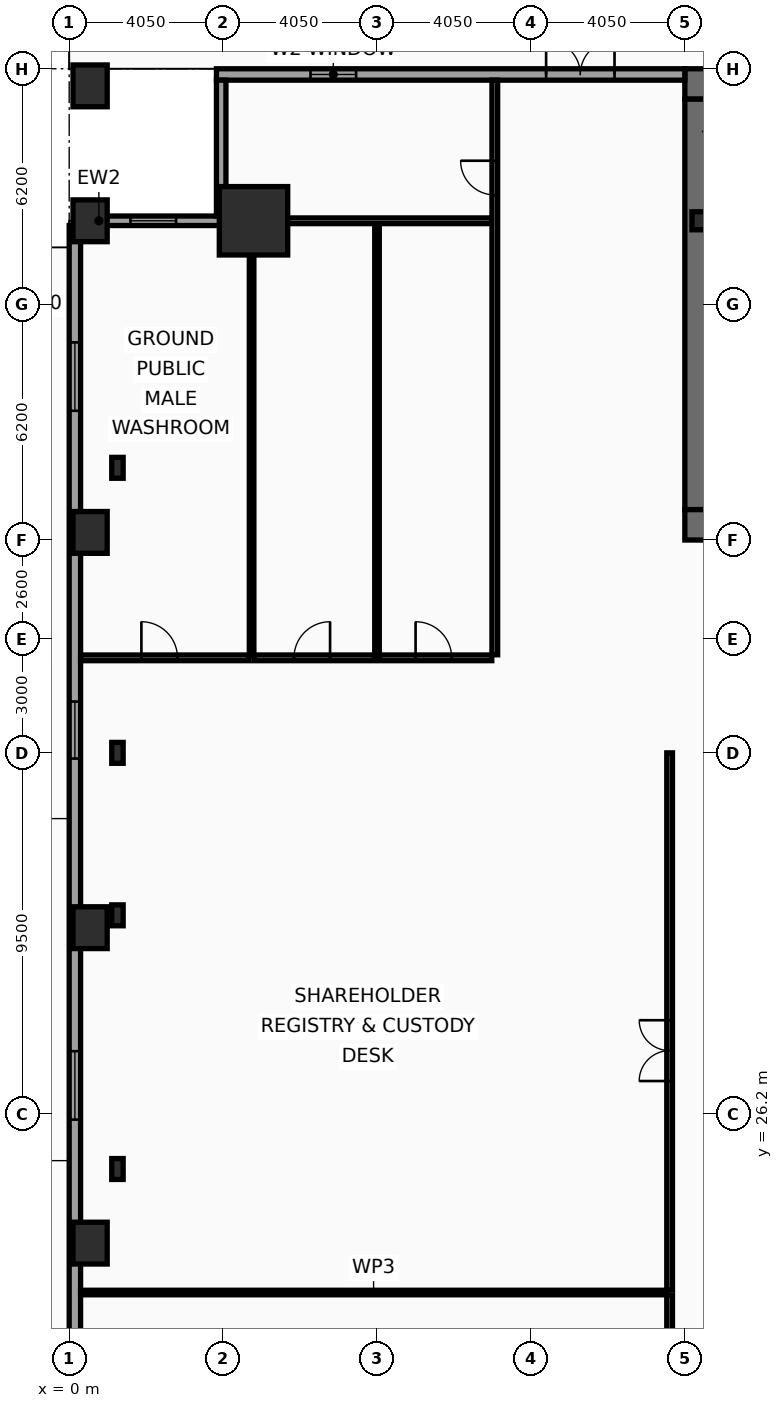
"""IFC4 building model, lengths in metres.
Left out: names, types, materials, properties, quantities, classifications, styles, units other than length and angle.
Written with IfcOpenShell. Run it as: python <this file> out.ifc"""

import sys

from ifc_helpers import new_model, si_unit, direction, frame, frame_2d, origin, origin_2d, place, context, subcontext, project, spatial, rectangle, hollow_rectangle, i_section, extrude, element, fill, save


model = new_model("IFC4")
c1 = context("Model", 3, precision=1e-05, world=origin(), true_north=direction((0.0, 1.0)))
c2 = subcontext(c1, "Body", "Model", "MODEL_VIEW")
j1 = project(units=[si_unit("LENGTHUNIT", "METRE"), si_unit("PLANEANGLEUNIT", "RADIAN")], contexts=[c1])
p1 = place(None, origin())
s1 = spatial("IfcSite", under=j1, at=p1, CompositionType="ELEMENT")
p2 = place(p1, origin())
s2 = spatial("IfcBuilding", under=s1, at=p2, CompositionType="ELEMENT")
p3 = place(p2, origin())
s3 = spatial("IfcBuildingStorey", under=s2, at=p3, CompositionType="ELEMENT", Elevation=0.0)
p4 = place(p3, frame((16.2, 53.3, 0.0), z_axis=(0.0, 0.0, 1.0), x_axis=(1.0, 0.0, 0.0)))
e1 = element("IfcWall", 1, at=p4, inside=s3, PredefinedType="SHEAR", context=c2, shape_type="SweptSolid", body=[
    extrude(rectangle(XDim=40.5, YDim=0.8, at=frame_2d((20.25, 0.0))), origin(), (0.0, 0.0, 1.0), 5.2),
])
p5 = place(p4, frame((2.8, 0.0, 0.0)))
e2 = element("IfcOpeningElement", 2, at=p5, cuts=e1, PredefinedType="OPENING", context=c2, shape_type="SweptSolid", body=[
    extrude(rectangle(XDim=1.8, YDim=2.4, at=frame_2d((0.9, 1.2))), frame((0.0, 0.41, 0.0), z_axis=(0.0, -1.0, 0.0), x_axis=(1.0, 0.0, 0.0)), (0.0, 0.0, 1.0), 0.82),
])
p6 = place(p4, frame((19.3, 0.0, 0.0)))
e3 = element("IfcOpeningElement", 3, at=p6, cuts=e1, PredefinedType="OPENING", context=c2, shape_type="SweptSolid", body=[
    extrude(rectangle(XDim=1.8, YDim=2.4, at=frame_2d((0.9, 1.2))), frame((0.0, 0.41, 0.0), z_axis=(0.0, -1.0, 0.0), x_axis=(1.0, 0.0, 0.0)), (0.0, 0.0, 1.0), 0.82),
])
p7 = place(p4, frame((35.9, 0.0, 0.0)))
e4 = element("IfcOpeningElement", 4, at=p7, cuts=e1, PredefinedType="OPENING", context=c2, shape_type="SweptSolid", body=[
    extrude(rectangle(XDim=1.8, YDim=2.4, at=frame_2d((0.9, 1.2))), frame((0.0, 0.41, 0.0), z_axis=(0.0, -1.0, 0.0), x_axis=(1.0, 0.0, 0.0)), (0.0, 0.0, 1.0), 0.82),
])
p8 = place(p3, frame((16.6, 42.1, 0.0), z_axis=(0.0, 0.0, 1.0), x_axis=(0.0, 1.0, 0.0)))
e5 = element("IfcWall", 5, at=p8, inside=s3, PredefinedType="SHEAR", context=c2, shape_type="SweptSolid", body=[
    extrude(rectangle(XDim=10.8, YDim=0.8, at=frame_2d((5.4, 0.0))), origin(), (0.0, 0.0, 1.0), 5.2),
])
p9 = place(p3, frame((18.65, 41.7, 0.0), z_axis=(0.0, 0.0, 1.0), x_axis=(-1.0, 0.0, 0.0)))
e6 = element("IfcWall", 6, at=p9, inside=s3, PredefinedType="SHEAR", context=c2, shape_type="SweptSolid", body=[
    extrude(rectangle(XDim=2.45, YDim=0.8, at=frame_2d((1.225, 0.0))), origin(), (0.0, 0.0, 1.0), 5.2),
])
p10 = place(p3, frame((4.85, 49.7, 0.0), z_axis=(0.0, 0.0, 1.0), x_axis=(1.0, 0.0, 0.0)))
e7 = element("IfcColumn", 7, at=p10, inside=s3, PredefinedType="COLUMN", context=c2, shape_type="SweptSolid", body=[
    extrude(hollow_rectangle(XDim=1.8, YDim=1.8, WallThickness=0.08, at=origin_2d()), origin(), (0.0, 0.0, 1.0), 5.4),
])
for number, where, z_axis, x_axis in (
    (8, (1.27, 24.75, 0.0), (0.0, 0.0, 1.0), (1.0, 0.0, 0.0)),
    (9, (1.27, 31.425, 0.0), (0.0, 0.0, 1.0), (1.0, 0.0, 0.0)),
    (10, (1.27, 35.7, 0.0), (0.0, 0.0, 1.0), (1.0, 0.0, 0.0)),
    (11, (1.27, 43.2, 0.0), (0.0, 0.0, 1.0), (1.0, 0.0, 0.0)),
):
    element("IfcColumn", number, at=place(p3, frame(where, z_axis=z_axis, x_axis=x_axis)), inside=s3, PredefinedType="COLUMN", context=c2, shape_type="SweptSolid", body=[
        extrude(i_section(OverallWidth=0.3, OverallDepth=0.55, WebThickness=0.015, FlangeThickness=0.029, at=origin_2d()), origin(), (0.0, 0.0, 1.0), 5.4),
    ])
p11 = place(p3, frame((16.6, 49.7, 0.0), z_axis=(0.0, 0.0, 1.0), x_axis=(1.0, 0.0, 0.0)))
e12 = element("IfcColumn", 12, at=p11, inside=s3, PredefinedType="COLUMN", context=c2, shape_type="SweptSolid", body=[
    extrude(i_section(OverallWidth=0.424, OverallDepth=0.474, WebThickness=0.048, FlangeThickness=0.077, at=origin_2d()), origin(), (0.0, 0.0, 1.0), 5.4),
])
for number, where, z_axis, x_axis in (
    (13, (0.55, 49.7, 0.0), (0.0, 0.0, 1.0), (1.0, 0.0, 0.0)),
    (14, (0.55, 53.25, 0.0), (0.0, 0.0, 1.0), (1.0, 0.0, 0.0)),
    (15, (0.55, 22.8, 0.0), (0.0, 0.0, 1.0), (1.0, 0.0, 0.0)),
    (16, (0.55, 31.1, 0.0), (0.0, 0.0, 1.0), (1.0, 0.0, 0.0)),
    (17, (0.55, 41.5, 0.0), (0.0, 0.0, 1.0), (1.0, 0.0, 0.0)),
):
    element("IfcColumn", number, at=place(p3, frame(where, z_axis=z_axis, x_axis=x_axis)), inside=s3, PredefinedType="PILASTER", context=c2, shape_type="SweptSolid", body=[
        extrude(rectangle(XDim=0.9, YDim=1.1, at=origin_2d()), origin(), (0.0, 0.0, 1.0), 5.4),
    ])
p12 = place(p3, frame((0.15, 49.575, 0.0), z_axis=(0.0, 0.0, 1.0), x_axis=(0.0, -1.0, 0.0)))
e18 = element("IfcWall", 18, at=p12, inside=s3, PredefinedType="SOLIDWALL", context=c2, shape_type="SweptSolid", body=[
    extrude(rectangle(XDim=49.275, YDim=0.3, at=frame_2d((24.637, 0.0))), origin(), (0.0, 0.0, 1.0), 4.54),
])
p13 = place(p12, frame((3.075, 0.0, 0.9)))
e19 = element("IfcOpeningElement", 19, at=p13, cuts=e18, PredefinedType="OPENING", context=c2, shape_type="SweptSolid", body=[
    extrude(rectangle(XDim=1.8, YDim=3.2, at=frame_2d((0.9, 1.6))), frame((0.0, 0.16, 0.0), z_axis=(0.0, -1.0, 0.0), x_axis=(1.0, 0.0, 0.0)), (0.0, 0.0, 1.0), 0.32),
])
p14 = place(p12, frame((12.525, 0.0, 0.9)))
e20 = element("IfcOpeningElement", 20, at=p14, cuts=e18, PredefinedType="OPENING", context=c2, shape_type="SweptSolid", body=[
    extrude(rectangle(XDim=1.5, YDim=2.4, at=frame_2d((0.75, 1.2))), frame((0.0, 0.16, 0.0), z_axis=(0.0, -1.0, 0.0), x_axis=(1.0, 0.0, 0.0)), (0.0, 0.0, 1.0), 0.32),
])
p15 = place(p12, frame((21.725, 0.0, 0.9)))
e21 = element("IfcOpeningElement", 21, at=p15, cuts=e18, PredefinedType="OPENING", context=c2, shape_type="SweptSolid", body=[
    extrude(rectangle(XDim=1.8, YDim=3.2, at=frame_2d((0.9, 1.6))), frame((0.0, 0.16, 0.0), z_axis=(0.0, -1.0, 0.0), x_axis=(1.0, 0.0, 0.0)), (0.0, 0.0, 1.0), 0.32),
])
p16 = place(p12, frame((30.175, 0.0, 0.9)))
e22 = element("IfcOpeningElement", 22, at=p16, cuts=e18, PredefinedType="OPENING", context=c2, shape_type="SweptSolid", body=[
    extrude(rectangle(XDim=1.5, YDim=2.4, at=frame_2d((0.75, 1.2))), frame((0.0, 0.16, 0.0), z_axis=(0.0, -1.0, 0.0), x_axis=(1.0, 0.0, 0.0)), (0.0, 0.0, 1.0), 0.32),
])
p17 = place(p12, frame((36.375, 0.0, 0.9)))
e23 = element("IfcOpeningElement", 23, at=p17, cuts=e18, PredefinedType="OPENING", context=c2, shape_type="SweptSolid", body=[
    extrude(rectangle(XDim=1.8, YDim=3.2, at=frame_2d((0.9, 1.6))), frame((0.0, 0.16, 0.0), z_axis=(0.0, -1.0, 0.0), x_axis=(1.0, 0.0, 0.0)), (0.0, 0.0, 1.0), 0.32),
])
p18 = place(p3, frame((3.875, 53.55, 0.0), z_axis=(0.0, 0.0, 1.0), x_axis=(1.0, 0.0, 0.0)))
e24 = element("IfcWall", 24, at=p18, inside=s3, PredefinedType="SOLIDWALL", context=c2, shape_type="SweptSolid", body=[
    extrude(rectangle(XDim=12.325, YDim=0.3, at=frame_2d((6.163, 0.0))), origin(), (0.0, 0.0, 1.0), 4.54),
])
p19 = place(p18, frame((8.675, 0.0, 0.0)))
e25 = element("IfcOpeningElement", 25, at=p19, cuts=e24, PredefinedType="OPENING", context=c2, shape_type="SweptSolid", body=[
    extrude(rectangle(XDim=1.8, YDim=2.4, at=frame_2d((0.9, 1.2))), frame((0.0, 0.16, 0.0), z_axis=(0.0, -1.0, 0.0), x_axis=(1.0, 0.0, 0.0)), (0.0, 0.0, 1.0), 0.32),
])
p20 = place(p18, frame((2.475, 0.0, 1.0)))
e26 = element("IfcOpeningElement", 26, at=p20, cuts=e24, PredefinedType="OPENING", context=c2, shape_type="SweptSolid", body=[
    extrude(rectangle(XDim=1.2, YDim=2.8, at=frame_2d((0.6, 1.4))), frame((0.0, 0.16, 0.0), z_axis=(0.0, -1.0, 0.0), x_axis=(1.0, 0.0, 0.0)), (0.0, 0.0, 1.0), 0.32),
])
p21 = place(p3, frame((0.3, 49.7, 0.0), z_axis=(0.0, 0.0, 1.0), x_axis=(1.0, 0.0, 0.0)))
e27 = element("IfcWall", 27, at=p21, inside=s3, PredefinedType="SOLIDWALL", context=c2, shape_type="SweptSolid", body=[
    extrude(rectangle(XDim=3.825, YDim=0.25, at=frame_2d((1.913, 0.0))), origin(), (0.0, 0.0, 1.0), 4.54),
])
p22 = place(p21, frame((1.312, 0.0, 0.9)))
e28 = element("IfcOpeningElement", 28, at=p22, cuts=e27, PredefinedType="OPENING", context=c2, shape_type="SweptSolid", body=[
    extrude(rectangle(XDim=1.2, YDim=2.8, at=frame_2d((0.6, 1.4))), frame((0.0, 0.135, 0.0), z_axis=(0.0, -1.0, 0.0), x_axis=(1.0, 0.0, 0.0)), (0.0, 0.0, 1.0), 0.27),
])
p23 = place(p3, frame((4.0, 49.825, 0.0), z_axis=(0.0, 0.0, 1.0), x_axis=(0.0, 1.0, 0.0)))
e29 = element("IfcWall", 29, at=p23, inside=s3, PredefinedType="SOLIDWALL", context=c2, shape_type="SweptSolid", body=[
    extrude(rectangle(XDim=3.575, YDim=0.25, at=frame_2d((1.788, 0.0))), origin(), (0.0, 0.0, 1.0), 4.54),
])
p24 = place(p3, frame((15.8, 7.12, 0.0), z_axis=(0.0, 0.0, 1.0), x_axis=(0.0, 1.0, 0.0)))
e30 = element("IfcWall", 30, at=p24, inside=s3, PredefinedType="PARTITIONING", context=c2, shape_type="SweptSolid", body=[
    extrude(rectangle(XDim=14.315, YDim=0.15, at=frame_2d((7.157, 0.0))), origin(), (0.0, 0.0, 1.0), 4.29),
])
p25 = place(p24, frame((5.5, 0.0, 0.0)))
e31 = element("IfcOpeningElement", 31, at=p25, cuts=e30, PredefinedType="OPENING", context=c2, shape_type="SweptSolid", body=[
    extrude(rectangle(XDim=1.6, YDim=2.15, at=frame_2d((0.8, 1.075))), frame((0.0, 0.085, 0.0), z_axis=(0.0, -1.0, 0.0), x_axis=(1.0, 0.0, 0.0)), (0.0, 0.0, 1.0), 0.17),
])
p26 = place(p3, frame((15.8, 21.565, 0.0), z_axis=(0.0, 0.0, 1.0), x_axis=(0.0, 1.0, 0.0)))
e32 = element("IfcWall", 32, at=p26, inside=s3, PredefinedType="PARTITIONING", context=c2, shape_type="SweptSolid", body=[
    extrude(rectangle(XDim=14.135, YDim=0.15, at=frame_2d((7.067, 0.0))), origin(), (0.0, 0.0, 1.0), 4.29),
])
p27 = place(p26, frame((5.5, 0.0, 0.0)))
e33 = element("IfcOpeningElement", 33, at=p27, cuts=e32, PredefinedType="OPENING", context=c2, shape_type="SweptSolid", body=[
    extrude(rectangle(XDim=1.6, YDim=2.15, at=frame_2d((0.8, 1.075))), frame((0.0, 0.085, 0.0), z_axis=(0.0, -1.0, 0.0), x_axis=(1.0, 0.0, 0.0)), (0.0, 0.0, 1.0), 0.17),
])
p28 = place(p3, frame((0.3, 21.5, 0.0), z_axis=(0.0, 0.0, 1.0), x_axis=(1.0, 0.0, 0.0)))
e34 = element("IfcWall", 34, at=p28, inside=s3, PredefinedType="PARTITIONING", context=c2, shape_type="SweptSolid", body=[
    extrude(rectangle(XDim=15.42, YDim=0.12, at=frame_2d((7.71, 0.0))), origin(), (0.0, 0.0, 1.0), 4.54),
])
p29 = place(p3, frame((4.125, 49.7, 0.0), z_axis=(0.0, 0.0, 1.0), x_axis=(1.0, 0.0, 0.0)))
e35 = element("IfcWall", 35, at=p29, inside=s3, PredefinedType="PARTITIONING", context=c2, shape_type="SweptSolid", body=[
    extrude(rectangle(XDim=6.995, YDim=0.15, at=frame_2d((3.498, 0.0))), origin(), (0.0, 0.0, 1.0), 5.2),
])
p30 = place(p3, frame((11.2, 38.28, 0.0), z_axis=(0.0, 0.0, 1.0), x_axis=(0.0, 1.0, 0.0)))
e36 = element("IfcWall", 36, at=p30, inside=s3, PredefinedType="PARTITIONING", context=c2, shape_type="SweptSolid", body=[
    extrude(rectangle(XDim=15.12, YDim=0.15, at=frame_2d((7.56, 0.0))), origin(), (0.0, 0.0, 1.0), 4.29),
])
p31 = place(p30, frame((12.1, 0.0, 0.0)))
e37 = element("IfcOpeningElement", 37, at=p31, cuts=e36, PredefinedType="OPENING", context=c2, shape_type="SweptSolid", body=[
    extrude(rectangle(XDim=0.9, YDim=2.05, at=frame_2d((0.45, 1.025))), frame((0.0, 0.085, 0.0), z_axis=(0.0, -1.0, 0.0), x_axis=(1.0, 0.0, 0.0)), (0.0, 0.0, 1.0), 0.17),
])
p32 = place(p3, frame((0.3, 38.2, 0.0), z_axis=(0.0, 0.0, 1.0), x_axis=(1.0, 0.0, 0.0)))
e38 = element("IfcWall", 38, at=p32, inside=s3, PredefinedType="PARTITIONING", context=c2, shape_type="SweptSolid", body=[
    extrude(rectangle(XDim=4.435, YDim=0.15, at=frame_2d((2.218, 0.0))), origin(), (0.0, 0.0, 1.0), 4.54),
])
p33 = place(p32, frame((1.6, 0.0, 0.0)))
e39 = element("IfcOpeningElement", 39, at=p33, cuts=e38, PredefinedType="OPENING", context=c2, shape_type="SweptSolid", body=[
    extrude(rectangle(XDim=0.95, YDim=2.05, at=frame_2d((0.475, 1.025))), frame((0.0, 0.085, 0.0), z_axis=(0.0, -1.0, 0.0), x_axis=(1.0, 0.0, 0.0)), (0.0, 0.0, 1.0), 0.17),
])
p34 = place(p3, frame((4.865, 38.2, 0.0), z_axis=(0.0, 0.0, 1.0), x_axis=(1.0, 0.0, 0.0)))
e40 = element("IfcWall", 40, at=p34, inside=s3, PredefinedType="PARTITIONING", context=c2, shape_type="SweptSolid", body=[
    extrude(rectangle(XDim=3.17, YDim=0.15, at=frame_2d((1.585, 0.0))), origin(), (0.0, 0.0, 1.0), 5.2),
])
p35 = place(p34, frame((1.05, 0.0, 0.0)))
e41 = element("IfcOpeningElement", 41, at=p35, cuts=e40, PredefinedType="OPENING", context=c2, shape_type="SweptSolid", body=[
    extrude(rectangle(XDim=0.95, YDim=2.05, at=frame_2d((0.475, 1.025))), frame((0.0, 0.085, 0.0), z_axis=(0.0, -1.0, 0.0), x_axis=(1.0, 0.0, 0.0)), (0.0, 0.0, 1.0), 0.17),
])
p36 = place(p3, frame((8.165, 38.2, 0.0), z_axis=(0.0, 0.0, 1.0), x_axis=(1.0, 0.0, 0.0)))
e42 = element("IfcWall", 42, at=p36, inside=s3, PredefinedType="PARTITIONING", context=c2, shape_type="SweptSolid", body=[
    extrude(rectangle(XDim=2.955, YDim=0.15, at=frame_2d((1.478, 0.0))), origin(), (0.0, 0.0, 1.0), 5.2),
])
p37 = place(p36, frame((0.95, 0.0, 0.0)))
e43 = element("IfcOpeningElement", 43, at=p37, cuts=e42, PredefinedType="OPENING", context=c2, shape_type="SweptSolid", body=[
    extrude(rectangle(XDim=0.95, YDim=2.05, at=frame_2d((0.475, 1.025))), frame((0.0, 0.085, 0.0), z_axis=(0.0, -1.0, 0.0), x_axis=(1.0, 0.0, 0.0)), (0.0, 0.0, 1.0), 0.17),
])
for number, where, z_axis, x_axis in (
    (44, (4.8, 38.28, 0.0), (0.0, 0.0, 1.0), (0.0, 1.0, 0.0)),
    (45, (8.1, 38.28, 0.0), (0.0, 0.0, 1.0), (0.0, 1.0, 0.0)),
):
    element("IfcWall", number, at=place(p3, frame(where, z_axis=z_axis, x_axis=x_axis)), inside=s3, PredefinedType="PARTITIONING", context=c2, shape_type="SweptSolid", body=[
        extrude(rectangle(XDim=11.27, YDim=0.12, at=frame_2d((5.635, 0.0))), origin(), (0.0, 0.0, 1.0), 4.29),
    ])
p38 = place(p13, origin())
e46 = element("IfcWindow", 46, at=p38, inside=s3, PartitioningType="SINGLE_PANEL", PredefinedType="WINDOW", context=c2, shape_type="SweptSolid", body=[
    extrude(rectangle(XDim=1.8, YDim=3.2, at=frame_2d((0.9, 1.6))), frame((0.0, 0.03, 0.0), z_axis=(0.0, -1.0, 0.0), x_axis=(1.0, 0.0, 0.0)), (0.0, 0.0, 1.0), 0.06),
])
fill(e19, e46)
p39 = place(p14, origin())
e47 = element("IfcWindow", 47, at=p39, inside=s3, PartitioningType="SINGLE_PANEL", PredefinedType="WINDOW", context=c2, shape_type="SweptSolid", body=[
    extrude(rectangle(XDim=1.5, YDim=2.4, at=frame_2d((0.75, 1.2))), frame((0.0, 0.03, 0.0), z_axis=(0.0, -1.0, 0.0), x_axis=(1.0, 0.0, 0.0)), (0.0, 0.0, 1.0), 0.06),
])
fill(e20, e47)
p40 = place(p15, origin())
e48 = element("IfcWindow", 48, at=p40, inside=s3, PartitioningType="SINGLE_PANEL", PredefinedType="WINDOW", context=c2, shape_type="SweptSolid", body=[
    extrude(rectangle(XDim=1.8, YDim=3.2, at=frame_2d((0.9, 1.6))), frame((0.0, 0.03, 0.0), z_axis=(0.0, -1.0, 0.0), x_axis=(1.0, 0.0, 0.0)), (0.0, 0.0, 1.0), 0.06),
])
fill(e21, e48)
p41 = place(p19, origin())
e49 = element("IfcDoor", 49, at=p41, inside=s3, OperationType="DOUBLE_DOOR_SINGLE_SWING", PredefinedType="DOOR", context=c2, shape_type="SweptSolid", body=[
    extrude(rectangle(XDim=1.8, YDim=2.4, at=frame_2d((0.9, 1.2))), frame((0.0, 0.025, 0.0), z_axis=(0.0, -1.0, 0.0), x_axis=(1.0, 0.0, 0.0)), (0.0, 0.0, 1.0), 0.05),
])
fill(e25, e49)
p42 = place(p20, origin())
e50 = element("IfcWindow", 50, at=p42, inside=s3, PartitioningType="SINGLE_PANEL", PredefinedType="WINDOW", context=c2, shape_type="SweptSolid", body=[
    extrude(rectangle(XDim=1.2, YDim=2.8, at=frame_2d((0.6, 1.4))), frame((0.0, 0.03, 0.0), z_axis=(0.0, -1.0, 0.0), x_axis=(1.0, 0.0, 0.0)), (0.0, 0.0, 1.0), 0.06),
])
fill(e26, e50)
p43 = place(p22, origin())
e51 = element("IfcWindow", 51, at=p43, inside=s3, PartitioningType="SINGLE_PANEL", PredefinedType="WINDOW", context=c2, shape_type="SweptSolid", body=[
    extrude(rectangle(XDim=1.2, YDim=2.8, at=frame_2d((0.6, 1.4))), frame((0.0, 0.03, 0.0), z_axis=(0.0, -1.0, 0.0), x_axis=(1.0, 0.0, 0.0)), (0.0, 0.0, 1.0), 0.06),
])
fill(e28, e51)
p44 = place(p27, origin())
e52 = element("IfcDoor", 52, at=p44, inside=s3, OperationType="DOUBLE_DOOR_SINGLE_SWING", PredefinedType="DOOR", context=c2, shape_type="SweptSolid", body=[
    extrude(rectangle(XDim=1.6, YDim=2.15, at=frame_2d((0.8, 1.075))), frame((0.0, 0.025, 0.0), z_axis=(0.0, -1.0, 0.0), x_axis=(1.0, 0.0, 0.0)), (0.0, 0.0, 1.0), 0.05),
])
fill(e33, e52)
p45 = place(p31, origin())
e53 = element("IfcDoor", 53, at=p45, inside=s3, OperationType="SINGLE_SWING_RIGHT", PredefinedType="DOOR", context=c2, shape_type="SweptSolid", body=[
    extrude(rectangle(XDim=0.9, YDim=2.05, at=frame_2d((0.45, 1.025))), frame((0.0, 0.025, 0.0), z_axis=(0.0, -1.0, 0.0), x_axis=(1.0, 0.0, 0.0)), (0.0, 0.0, 1.0), 0.05),
])
fill(e37, e53)
p46 = place(p33, origin())
e54 = element("IfcDoor", 54, at=p46, inside=s3, OperationType="SINGLE_SWING_LEFT", PredefinedType="DOOR", context=c2, shape_type="SweptSolid", body=[
    extrude(rectangle(XDim=0.95, YDim=2.05, at=frame_2d((0.475, 1.025))), frame((0.0, 0.025, 0.0), z_axis=(0.0, -1.0, 0.0), x_axis=(1.0, 0.0, 0.0)), (0.0, 0.0, 1.0), 0.05),
])
fill(e39, e54)
p47 = place(p35, origin())
e55 = element("IfcDoor", 55, at=p47, inside=s3, OperationType="SINGLE_SWING_RIGHT", PredefinedType="DOOR", context=c2, shape_type="SweptSolid", body=[
    extrude(rectangle(XDim=0.95, YDim=2.05, at=frame_2d((0.475, 1.025))), frame((0.0, 0.025, 0.0), z_axis=(0.0, -1.0, 0.0), x_axis=(1.0, 0.0, 0.0)), (0.0, 0.0, 1.0), 0.05),
])
fill(e41, e55)
p48 = place(p37, origin())
e56 = element("IfcDoor", 56, at=p48, inside=s3, OperationType="SINGLE_SWING_LEFT", PredefinedType="DOOR", context=c2, shape_type="SweptSolid", body=[
    extrude(rectangle(XDim=0.95, YDim=2.05, at=frame_2d((0.475, 1.025))), frame((0.0, 0.025, 0.0), z_axis=(0.0, -1.0, 0.0), x_axis=(1.0, 0.0, 0.0)), (0.0, 0.0, 1.0), 0.05),
])
fill(e43, e56)
save(model, sys.argv[1])
